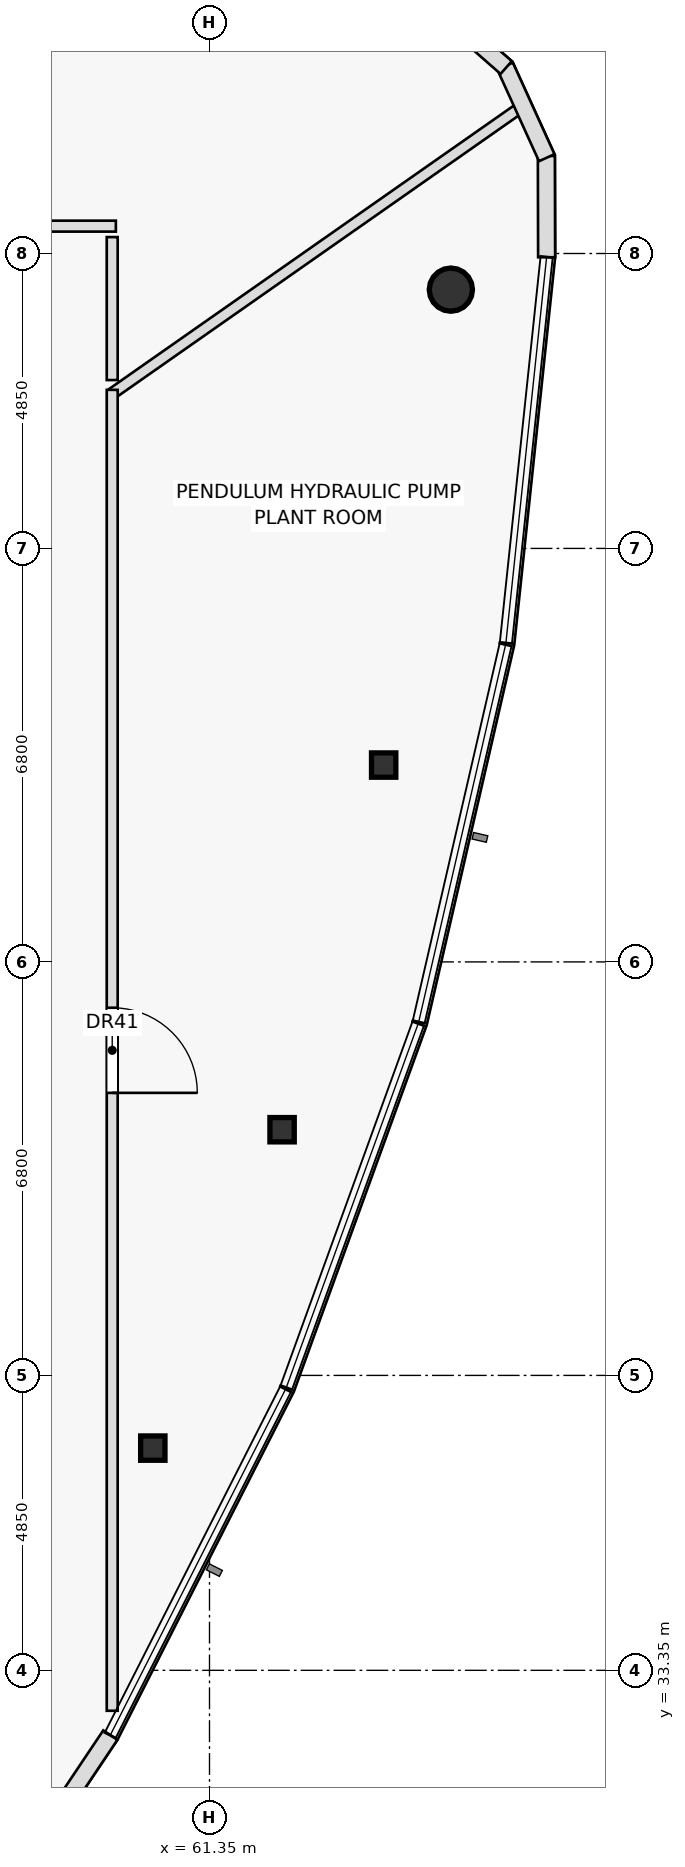
"""IFC4 building model, lengths in metres.
Left out: names, types, materials, properties, quantities, classifications, styles, units other than length and angle.
Written with IfcOpenShell. Run it as: python <this file> out.ifc"""

import sys

from ifc_helpers import new_model, si_unit, direction, frame, frame_2d, origin, origin_2d, place, context, subcontext, project, spatial, rectangle, hollow_rectangle, hollow_circle, extrude, element, fill, save


model = new_model("IFC4")
c1 = context("Model", 3, precision=1e-05, world=origin(), true_north=direction((0.0, 1.0)))
c2 = subcontext(c1, "Body", "Model", "MODEL_VIEW")
j1 = project(units=[si_unit("LENGTHUNIT", "METRE"), si_unit("PLANEANGLEUNIT", "RADIAN")], contexts=[c1])
p1 = place(None, origin())
s1 = spatial("IfcSite", under=j1, at=p1, CompositionType="ELEMENT")
p2 = place(p1, origin())
s2 = spatial("IfcBuilding", under=s1, at=p2, CompositionType="ELEMENT")
p3 = place(p2, frame((0.0, 0.0, 325.5)))
s3 = spatial("IfcBuildingStorey", under=s2, at=p3, CompositionType="ELEMENT", Elevation=325.5)
for number, where, z_axis, x_axis in (
    (1, (60.417, 37.004, 0.0), (0.0, 0.0, 1.0), (1.0, 0.0, 0.0)),
    (2, (62.544, 42.24, 0.0), (0.0, 0.0, 1.0), (1.0, 0.0, 0.0)),
    (3, (64.214, 48.237, 0.0), (0.0, 0.0, 1.0), (1.0, 0.0, 0.0)),
):
    element("IfcColumn", number, at=place(p3, frame(where, z_axis=z_axis, x_axis=x_axis)), inside=s3, PredefinedType="COLUMN", context=c2, shape_type="SweptSolid", body=[
        extrude(hollow_rectangle(XDim=0.4, YDim=0.4, WallThickness=0.025, at=origin_2d()), origin(), (0.0, 0.0, 1.0), 6.25),
    ])
p4 = place(p3, frame((65.32, 56.056, 0.0), z_axis=(0.0, 0.0, 1.0), x_axis=(1.0, 0.0, 0.0)))
e4 = element("IfcColumn", 4, at=p4, inside=s3, PredefinedType="COLUMN", context=c2, shape_type="SweptSolid", body=[
    extrude(hollow_circle(Radius=0.355, WallThickness=0.032, at=origin_2d()), origin(), (0.0, 0.0, 1.0), 6.25),
])
p5 = place(p3, frame((59.75, 54.348, 0.0), z_axis=(0.0, 0.0, 1.0), x_axis=(0.819158229677, 0.573567602601, 0.0)))
e5 = element("IfcWall", 5, at=p5, inside=s3, PredefinedType="PARTITIONING", context=c2, shape_type="SweptSolid", body=[
    extrude(rectangle(XDim=8.25, YDim=0.18, at=frame_2d((4.125, 0.0))), origin(), (0.0, 0.0, 1.0), 3.725),
])
p6 = place(p3, frame((35.08, 57.1, 0.0), z_axis=(0.0, 0.0, 1.0), x_axis=(1.0, 0.0, 0.0)))
e6 = element("IfcWall", 6, at=p6, inside=s3, PredefinedType="PARTITIONING", context=c2, shape_type="SweptSolid", body=[
    extrude(rectangle(XDim=24.73, YDim=0.18, at=frame_2d((12.365, 0.0))), origin(), (0.0, 0.0, 1.0), 4.625),
])
p7 = place(p6, frame((11.665, 0.0, 0.0)))
e7 = element("IfcOpeningElement", 7, at=p7, cuts=e6, PredefinedType="OPENING", context=c2, shape_type="SweptSolid", body=[
    extrude(rectangle(XDim=1.4, YDim=2.15, at=frame_2d((0.7, 1.075))), frame((0.0, 0.1, 0.0), z_axis=(0.0, -1.0, 0.0), x_axis=(1.0, 0.0, 0.0)), (0.0, 0.0, 1.0), 0.2),
])
p8 = place(p3, frame((59.75, 56.92, 0.0), z_axis=(0.0, 0.0, 1.0), x_axis=(0.0, -1.0, 0.0)))
e8 = element("IfcWall", 8, at=p8, inside=s3, PredefinedType="PARTITIONING", context=c2, shape_type="SweptSolid", body=[
    extrude(rectangle(XDim=2.351, YDim=0.18, at=frame_2d((1.176, 0.0))), origin(), (0.0, 0.0, 1.0), 6.25),
])
p9 = place(p3, frame((59.75, 54.408, 0.0), z_axis=(0.0, 0.0, 1.0), x_axis=(0.0, -1.0, 0.0)))
e9 = element("IfcWall", 9, at=p9, inside=s3, PredefinedType="PARTITIONING", context=c2, shape_type="SweptSolid", body=[
    extrude(rectangle(XDim=21.723, YDim=0.18, at=frame_2d((10.861, 0.0))), origin(), (0.0, 0.0, 1.0), 4.625),
])
p10 = place(p9, frame((10.161, 0.0, 0.0)))
e10 = element("IfcOpeningElement", 10, at=p10, cuts=e9, PredefinedType="OPENING", context=c2, shape_type="SweptSolid", body=[
    extrude(rectangle(XDim=1.4, YDim=2.15, at=frame_2d((0.7, 1.075))), frame((0.0, 0.1, 0.0), z_axis=(0.0, -1.0, 0.0), x_axis=(1.0, 0.0, 0.0)), (0.0, 0.0, 1.0), 0.2),
])
p11 = place(p3, frame((56.148, 26.956, 0.0), z_axis=(0.0, 0.0, 1.0), x_axis=(0.556666056539, 0.830736361006, 0.0)))
e11 = element("IfcWall", 11, at=p11, inside=s3, PredefinedType="STANDARD", context=c2, shape_type="SweptSolid", body=[
    extrude(rectangle(XDim=6.415, YDim=0.28, at=frame_2d((3.207, 0.0))), origin(), (0.0, 0.0, 1.0), 6.25),
])
p12 = place(p3, frame((66.895, 56.588, 0.0), z_axis=(0.0, 0.0, 1.0), x_axis=(-0.002637739944, 0.999996521158, 0.0)))
e12 = element("IfcWall", 12, at=p12, inside=s3, PredefinedType="STANDARD", context=c2, shape_type="SweptSolid", body=[
    extrude(rectangle(XDim=1.666, YDim=0.28, at=frame_2d((0.833, 0.0))), origin(), (0.0, 0.0, 1.0), 6.25),
])
p13 = place(p3, frame((66.896, 58.226, 0.0), z_axis=(0.0, 0.0, 1.0), x_axis=(-0.413914118792, 0.910315935412, 0.0)))
e13 = element("IfcWall", 13, at=p13, inside=s3, PredefinedType="STANDARD", context=c2, shape_type="SweptSolid", body=[
    extrude(rectangle(XDim=1.655, YDim=0.28, at=frame_2d((0.827, 0.0))), origin(), (0.0, 0.0, 1.0), 6.25),
])
p14 = place(p3, frame((66.229, 59.708, 0.0), z_axis=(0.0, 0.0, 1.0), x_axis=(-0.751716758053, 0.659486099674, 0.0)))
e14 = element("IfcWall", 14, at=p14, inside=s3, PredefinedType="STANDARD", context=c2, shape_type="SweptSolid", body=[
    extrude(rectangle(XDim=1.654, YDim=0.28, at=frame_2d((0.827, 0.0))), origin(), (0.0, 0.0, 1.0), 6.25),
])
p15 = place(p10, origin())
e15 = element("IfcDoor", 15, at=p15, inside=s3, OperationType="SINGLE_SWING_RIGHT", PredefinedType="DOOR", context=c2, shape_type="SweptSolid", body=[
    extrude(rectangle(XDim=1.4, YDim=2.15, at=frame_2d((0.7, 1.075))), frame((0.0, 0.025, 0.0), z_axis=(0.0, -1.0, 0.0), x_axis=(1.0, 0.0, 0.0)), (0.0, 0.0, 1.0), 0.05),
])
fill(e10, e15)
save(model, sys.argv[1])
